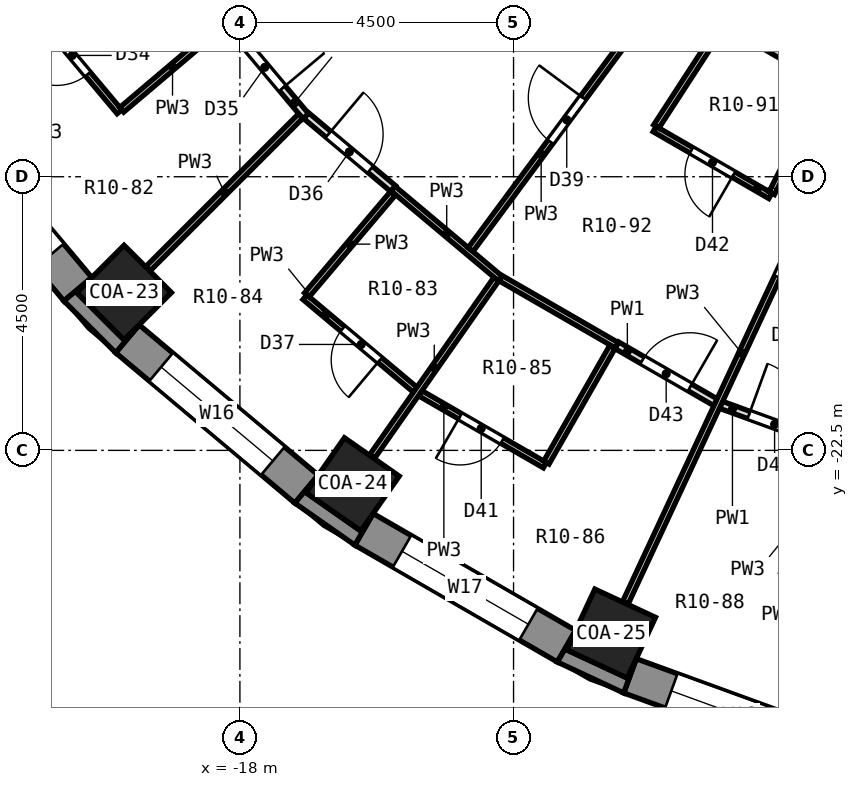
"""IFC4 building model, lengths in metres.
Left out: names, types, materials, properties, quantities, classifications, styles, units other than length and angle.
Written with IfcOpenShell. Run it as: python <this file> out.ifc"""

import sys

from ifc_helpers import new_model, si_unit, direction, frame, frame_2d, origin, origin_2d, place, context, subcontext, project, spatial, polyline, rectangle, outline, extrude, element, fill, save


model = new_model("IFC4")
c1 = context("Model", 3, precision=1e-05, world=origin(), true_north=direction((0.0, 1.0)))
c2 = subcontext(c1, "Body", "Model", "MODEL_VIEW")
j1 = project(units=[si_unit("LENGTHUNIT", "METRE"), si_unit("PLANEANGLEUNIT", "RADIAN")], contexts=[c1])
p1 = place(None, origin())
s1 = spatial("IfcSite", under=j1, at=p1, CompositionType="ELEMENT")
p2 = place(p1, origin())
s2 = spatial("IfcBuilding", under=s1, at=p2, CompositionType="ELEMENT")
p3 = place(p2, frame((0.0, 0.0, 36.2)))
s3 = spatial("IfcBuildingStorey", under=s2, at=p3, CompositionType="ELEMENT", Elevation=36.2)
for number, where, z_axis, x_axis in (
    (1, (-19.905, -19.905, 0.0), (0.0, 0.0, 1.0), (-0.707, -0.707, 0.0)),
    (2, (-16.146, -23.059, 0.0), (0.0, 0.0, 1.0), (-0.574, -0.819, 0.0)),
    (3, (-11.897, -25.512, 0.0), (0.0, 0.0, 1.0), (-0.423, -0.906, 0.0)),
):
    element("IfcColumn", number, at=place(p3, frame(where, z_axis=z_axis, x_axis=x_axis)), inside=s3, PredefinedType="COLUMN", context=c2, shape_type="SweptSolid", body=[
        extrude(rectangle(XDim=1.1, YDim=1.1, at=origin_2d()), origin(), (0.0, 0.0, 1.0), 3.3),
    ])
p4 = place(p3, frame((-23.137, -16.904, 0.0), z_axis=(0.0, 0.0, 1.0), x_axis=(0.642809392687, -0.766026164483, 0.0)))
e4 = element("IfcWall", 4, at=p4, inside=s3, PredefinedType="SOLIDWALL", context=c2, shape_type="SweptSolid", body=[
    extrude(rectangle(XDim=3.846, YDim=0.6, at=frame_2d((1.923, 0.0))), origin(), (0.0, 0.0, 1.0), 2.75),
])
p5 = place(p4, frame((0.723, 0.0, 0.9)))
e5 = element("IfcOpeningElement", 5, at=p5, cuts=e4, PredefinedType="OPENING", context=c2, shape_type="SweptSolid", body=[
    extrude(rectangle(XDim=2.4, YDim=1.8, at=frame_2d((1.2, 0.9))), frame((0.0, 0.312, 0.0), z_axis=(0.0, -1.0, 0.0), x_axis=(1.0, 0.0, 0.0)), (0.0, 0.0, 1.0), 0.624),
])
p6 = place(p3, frame((-19.85, -20.665, 0.0), z_axis=(0.0, 0.0, 1.0), x_axis=(0.766026164483, -0.642809392687, 0.0)))
e6 = element("IfcWall", 6, at=p6, inside=s3, PredefinedType="SOLIDWALL", context=c2, shape_type="SweptSolid", body=[
    extrude(rectangle(XDim=3.846, YDim=0.6, at=frame_2d((1.923, 0.0))), origin(), (0.0, 0.0, 1.0), 2.75),
])
p7 = place(p6, frame((0.723, 0.0, 0.9)))
e7 = element("IfcOpeningElement", 7, at=p7, cuts=e6, PredefinedType="OPENING", context=c2, shape_type="SweptSolid", body=[
    extrude(rectangle(XDim=2.4, YDim=1.8, at=frame_2d((1.2, 0.9))), frame((0.0, 0.312, 0.0), z_axis=(0.0, -1.0, 0.0), x_axis=(1.0, 0.0, 0.0)), (0.0, 0.0, 1.0), 0.624),
])
p8 = place(p3, frame((-15.96, -23.798, 0.0), z_axis=(0.0, 0.0, 1.0), x_axis=(0.86603124159, -0.499989888488, 0.0)))
e8 = element("IfcWall", 8, at=p8, inside=s3, PredefinedType="SOLIDWALL", context=c2, shape_type="SweptSolid", body=[
    extrude(rectangle(XDim=3.846, YDim=0.6, at=frame_2d((1.923, 0.0))), origin(), (0.0, 0.0, 1.0), 2.75),
])
p9 = place(p8, frame((0.723, 0.0, 0.9)))
e9 = element("IfcOpeningElement", 9, at=p9, cuts=e8, PredefinedType="OPENING", context=c2, shape_type="SweptSolid", body=[
    extrude(rectangle(XDim=2.4, YDim=1.8, at=frame_2d((1.2, 0.9))), frame((0.0, 0.312, 0.0), z_axis=(0.0, -1.0, 0.0), x_axis=(1.0, 0.0, 0.0)), (0.0, 0.0, 1.0), 0.624),
])
p10 = place(p3, frame((-11.585, -26.208, 0.0), z_axis=(0.0, 0.0, 1.0), x_axis=(0.939689588564, -0.342028474173, 0.0)))
e10 = element("IfcWall", 10, at=p10, inside=s3, PredefinedType="SOLIDWALL", context=c2, shape_type="SweptSolid", body=[
    extrude(rectangle(XDim=3.846, YDim=0.6, at=frame_2d((1.923, 0.0))), origin(), (0.0, 0.0, 1.0), 2.75),
])
p11 = place(p10, frame((0.723, 0.0, 0.9)))
e11 = element("IfcOpeningElement", 11, at=p11, cuts=e10, PredefinedType="OPENING", context=c2, shape_type="SweptSolid", body=[
    extrude(rectangle(XDim=2.4, YDim=1.8, at=frame_2d((1.2, 0.9))), frame((0.0, 0.312, 0.0), z_axis=(0.0, -1.0, 0.0), x_axis=(1.0, 0.0, 0.0)), (0.0, 0.0, 1.0), 0.624),
])
p12 = place(p3, origin())
e12 = element("IfcWall", 12, at=p12, inside=s3, PredefinedType="SOLIDWALL", context=c2, shape_type="SweptSolid", body=[
    extrude(outline(polyline([(-20.043, -20.895), (-19.657, -20.435), (-19.905, -20.683), (-20.683, -19.905), (-20.435, -19.657), (-20.895, -20.043), (-20.043, -20.895)])), origin(), (0.0, 0.0, 1.0), 2.75),
])
p13 = place(p3, origin())
e13 = element("IfcWall", 13, at=p13, inside=s3, PredefinedType="SOLIDWALL", context=c2, shape_type="SweptSolid", body=[
    extrude(outline(polyline([(-17.097, -23.367), (-16.11, -24.058), (-15.81, -23.538), (-16.011, -23.825), (-16.912, -23.194), (-16.711, -22.907), (-17.097, -23.367)])), origin(), (0.0, 0.0, 1.0), 2.75),
])
p14 = place(p3, origin())
e14 = element("IfcWall", 14, at=p14, inside=s3, PredefinedType="SOLIDWALL", context=c2, shape_type="SweptSolid", body=[
    extrude(outline(polyline([(-11.688, -26.49), (-11.483, -25.926), (-11.631, -26.243), (-12.628, -25.779), (-12.479, -25.461), (-12.78, -25.981), (-11.688, -26.49)])), origin(), (0.0, 0.0, 1.0), 2.75),
])
p15 = place(p3, frame((-21.503, -15.117, 0.0), z_axis=(0.0, 0.0, 1.0), x_axis=(0.642807507344, -0.766027746561, 0.0)))
e15 = element("IfcWall", 15, at=p15, inside=s3, PredefinedType="PARTITIONING", context=c2, shape_type="SweptSolid", body=[
    extrude(rectangle(XDim=2.368, YDim=0.1, at=frame_2d((1.184, 0.0))), origin(), (0.0, 0.0, 1.0), 2.75),
])
p16 = place(p15, frame((0.759, 0.0, 0.0)))
e16 = element("IfcOpeningElement", 16, at=p16, cuts=e15, PredefinedType="OPENING", context=c2, shape_type="SweptSolid", body=[
    extrude(rectangle(XDim=0.8, YDim=2.1, at=frame_2d((0.4, 1.05))), frame((0.0, 0.062, 0.0), z_axis=(0.0, -1.0, 0.0), x_axis=(1.0, 0.0, 0.0)), (0.0, 0.0, 1.0), 0.124),
])
p17 = place(p3, frame((-18.194, -15.482, 0.0), z_axis=(0.0, 0.0, 1.0), x_axis=(0.642633191675, -0.766173988698, 0.0)))
e17 = element("IfcWall", 17, at=p17, inside=s3, PredefinedType="PARTITIONING", context=c2, shape_type="SweptSolid", body=[
    extrude(rectangle(XDim=1.988, YDim=0.125, at=frame_2d((0.994, 0.0))), origin(), (0.0, 0.0, 1.0), 2.75),
])
p18 = place(p17, frame((0.487, 0.0, 0.0)))
e18 = element("IfcOpeningElement", 18, at=p18, cuts=e17, PredefinedType="OPENING", context=c2, shape_type="SweptSolid", body=[
    extrude(rectangle(XDim=0.9, YDim=2.1, at=frame_2d((0.45, 1.05))), frame((0.0, 0.074, 0.0), z_axis=(0.0, -1.0, 0.0), x_axis=(1.0, 0.0, 0.0)), (0.0, 0.0, 1.0), 0.149),
])
p19 = place(p3, frame((-16.931, -19.981, 0.0), z_axis=(0.0, 0.0, 1.0), x_axis=(0.766027746561, -0.642807507344, 0.0)))
e19 = element("IfcWall", 19, at=p19, inside=s3, PredefinedType="PARTITIONING", context=c2, shape_type="SweptSolid", body=[
    extrude(rectangle(XDim=2.368, YDim=0.1, at=frame_2d((1.184, 0.0))), origin(), (0.0, 0.0, 1.0), 2.75),
])
p20 = place(p19, frame((0.809, 0.0, 0.0)))
e20 = element("IfcOpeningElement", 20, at=p20, cuts=e19, PredefinedType="OPENING", context=c2, shape_type="SweptSolid", body=[
    extrude(rectangle(XDim=0.8, YDim=2.1, at=frame_2d((0.4, 1.05))), frame((0.0, 0.062, 0.0), z_axis=(0.0, -1.0, 0.0), x_axis=(1.0, 0.0, 0.0)), (0.0, 0.0, 1.0), 0.124),
])
p21 = place(p3, frame((-15.482, -18.194, 0.0), z_axis=(0.0, 0.0, 1.0), x_axis=(0.765838323525, -0.643033173499, 0.0)))
e21 = element("IfcWall", 21, at=p21, inside=s3, PredefinedType="PARTITIONING", context=c2, shape_type="SweptSolid", body=[
    extrude(rectangle(XDim=2.306, YDim=0.1, at=frame_2d((1.153, 0.0))), origin(), (0.0, 0.0, 1.0), 2.75),
])
p22 = place(p3, frame((-16.909, -16.997, 0.0), z_axis=(0.0, 0.0, 1.0), x_axis=(0.766154061521, -0.642656948935, 0.0)))
e22 = element("IfcWall", 22, at=p22, inside=s3, PredefinedType="PARTITIONING", context=c2, shape_type="SweptSolid", body=[
    extrude(rectangle(XDim=1.862, YDim=0.125, at=frame_2d((0.931, 0.0))), origin(), (0.0, 0.0, 1.0), 2.75),
])
p23 = place(p22, frame((0.475, 0.0, 0.0)))
e23 = element("IfcOpeningElement", 23, at=p23, cuts=e22, PredefinedType="OPENING", context=c2, shape_type="SweptSolid", body=[
    extrude(rectangle(XDim=0.9, YDim=2.1, at=frame_2d((0.45, 1.05))), frame((0.0, 0.074, 0.0), z_axis=(0.0, -1.0, 0.0), x_axis=(1.0, 0.0, 0.0)), (0.0, 0.0, 1.0), 0.149),
])
p24 = place(p3, frame((-15.036, -21.56, 0.0), z_axis=(0.0, 0.0, 1.0), x_axis=(0.866032766724, -0.499987246797, 0.0)))
e24 = element("IfcWall", 24, at=p24, inside=s3, PredefinedType="PARTITIONING", context=c2, shape_type="SweptSolid", body=[
    extrude(rectangle(XDim=2.368, YDim=0.1, at=frame_2d((1.184, 0.0))), origin(), (0.0, 0.0, 1.0), 2.75),
])
p25 = place(p24, frame((0.759, 0.0, 0.0)))
e25 = element("IfcOpeningElement", 25, at=p25, cuts=e24, PredefinedType="OPENING", context=c2, shape_type="SweptSolid", body=[
    extrude(rectangle(XDim=0.8, YDim=2.1, at=frame_2d((0.4, 1.05))), frame((0.0, 0.062, 0.0), z_axis=(0.0, -1.0, 0.0), x_axis=(1.0, 0.0, 0.0)), (0.0, 0.0, 1.0), 0.124),
])
p26 = place(p3, frame((-13.712, -19.669, 0.0), z_axis=(0.0, 0.0, 1.0), x_axis=(0.865958826185, -0.500115298058, 0.0)))
e26 = element("IfcWall", 26, at=p26, inside=s3, PredefinedType="PARTITIONING", context=c2, shape_type="SweptSolid", body=[
    extrude(rectangle(XDim=2.206, YDim=0.1, at=frame_2d((1.103, 0.0))), origin(), (0.0, 0.0, 1.0), 2.75),
])
p27 = place(p3, frame((-11.802, -20.772, 0.0), z_axis=(0.0, 0.0, 1.0), x_axis=(0.866103179807, -0.499865263774, 0.0)))
e27 = element("IfcWall", 27, at=p27, inside=s3, PredefinedType="PARTITIONING", context=c2, shape_type="SweptSolid", body=[
    extrude(rectangle(XDim=1.875, YDim=0.125, at=frame_2d((0.937, 0.0))), origin(), (0.0, 0.0, 1.0), 2.75),
])
p28 = place(p27, frame((0.487, 0.0, 0.0)))
e28 = element("IfcOpeningElement", 28, at=p28, cuts=e27, PredefinedType="OPENING", context=c2, shape_type="SweptSolid", body=[
    extrude(rectangle(XDim=0.9, YDim=2.1, at=frame_2d((0.45, 1.05))), frame((0.0, 0.074, 0.0), z_axis=(0.0, -1.0, 0.0), x_axis=(1.0, 0.0, 0.0)), (0.0, 0.0, 1.0), 0.149),
])
p29 = place(p3, frame((-11.18, -17.216, 0.0), z_axis=(0.0, 0.0, 1.0), x_axis=(0.865970937006, -0.500094327363, 0.0)))
e29 = element("IfcWall", 29, at=p29, inside=s3, PredefinedType="PARTITIONING", context=c2, shape_type="SweptSolid", body=[
    extrude(rectangle(XDim=2.197, YDim=0.1, at=frame_2d((1.099, 0.0))), origin(), (0.0, 0.0, 1.0), 2.75),
])
p30 = place(p29, frame((0.699, 0.0, 0.0)))
e30 = element("IfcOpeningElement", 30, at=p30, cuts=e29, PredefinedType="OPENING", context=c2, shape_type="SweptSolid", body=[
    extrude(rectangle(XDim=0.8, YDim=2.1, at=frame_2d((0.4, 1.05))), frame((0.0, 0.062, 0.0), z_axis=(0.0, -1.0, 0.0), x_axis=(1.0, 0.0, 0.0)), (0.0, 0.0, 1.0), 0.124),
])
p31 = place(p3, frame((-13.416, -13.501, 0.0), z_axis=(0.0, 0.0, 1.0), x_axis=(0.86605048973, -0.49995654735, 0.0)))
e31 = element("IfcWall", 31, at=p31, inside=s3, PredefinedType="PARTITIONING", context=c2, shape_type="SweptSolid", body=[
    extrude(rectangle(XDim=9.871, YDim=0.125, at=frame_2d((4.935, 0.0))), origin(), (0.0, 0.0, 1.0), 2.75),
])
p32 = place(p31, frame((2.938, 0.0, 0.0)))
e32 = element("IfcOpeningElement", 32, at=p32, cuts=e31, PredefinedType="OPENING", context=c2, shape_type="SweptSolid", body=[
    extrude(rectangle(XDim=0.8, YDim=2.1, at=frame_2d((0.4, 1.05))), frame((0.0, 0.074, 0.0), z_axis=(0.0, -1.0, 0.0), x_axis=(1.0, 0.0, 0.0)), (0.0, 0.0, 1.0), 0.149),
])
p33 = place(p3, frame((-10.088, -21.751, 0.0), z_axis=(0.0, 0.0, 1.0), x_axis=(0.939656514106, -0.342119329325, 0.0)))
e33 = element("IfcWall", 33, at=p33, inside=s3, PredefinedType="PARTITIONING", context=c2, shape_type="SweptSolid", body=[
    extrude(rectangle(XDim=1.875, YDim=0.125, at=frame_2d((0.938, 0.0))), origin(), (0.0, 0.0, 1.0), 2.75),
])
p34 = place(p33, frame((0.488, 0.0, 0.0)))
e34 = element("IfcOpeningElement", 34, at=p34, cuts=e33, PredefinedType="OPENING", context=c2, shape_type="SweptSolid", body=[
    extrude(rectangle(XDim=0.9, YDim=2.1, at=frame_2d((0.45, 1.05))), frame((0.0, 0.074, 0.0), z_axis=(0.0, -1.0, 0.0), x_axis=(1.0, 0.0, 0.0)), (0.0, 0.0, 1.0), 0.149),
])
p35 = place(p3, frame((-19.943, -16.899, 0.0), z_axis=(0.0, 0.0, 1.0), x_axis=(0.762954369322, 0.646452341887, 0.0)))
e35 = element("IfcWall", 35, at=p35, inside=s3, PredefinedType="PARTITIONING", context=c2, shape_type="SweptSolid", body=[
    extrude(rectangle(XDim=2.188, YDim=0.1, at=frame_2d((1.094, 0.0))), origin(), (0.0, 0.0, 1.0), 2.75),
])
p36 = place(p3, frame((-19.509, -19.509, 0.0), z_axis=(0.0, 0.0, 1.0), x_axis=(0.707106781187, 0.707106781187, 0.0)))
e36 = element("IfcWall", 36, at=p36, inside=s3, PredefinedType="PARTITIONING", context=c2, shape_type="SweptSolid", body=[
    extrude(rectangle(XDim=3.547, YDim=0.1, at=frame_2d((1.773, 0.0))), origin(), (0.0, 0.0, 1.0), 2.75),
])
p37 = place(p3, frame((-16.899, -19.943, 0.0), z_axis=(0.0, 0.0, 1.0), x_axis=(0.646452341887, 0.762954369322, 0.0)))
e37 = element("IfcWall", 37, at=p37, inside=s3, PredefinedType="PARTITIONING", context=c2, shape_type="SweptSolid", body=[
    extrude(rectangle(XDim=2.188, YDim=0.1, at=frame_2d((1.094, 0.0))), origin(), (0.0, 0.0, 1.0), 2.75),
])
p38 = place(p3, frame((-14.207, -19.199, 0.0), z_axis=(0.0, 0.0, 1.0), x_axis=(0.595318943931, 0.80348948655, 0.0)))
e38 = element("IfcWall", 38, at=p38, inside=s3, PredefinedType="PARTITIONING", context=c2, shape_type="SweptSolid", body=[
    extrude(rectangle(XDim=5.302, YDim=0.1, at=frame_2d((2.651, 0.0))), origin(), (0.0, 0.0, 1.0), 2.75),
])
p39 = place(p38, frame((2.207, 0.0, 0.0)))
e39 = element("IfcOpeningElement", 39, at=p39, cuts=e38, PredefinedType="OPENING", context=c2, shape_type="SweptSolid", body=[
    extrude(rectangle(XDim=0.9, YDim=2.1, at=frame_2d((0.45, 1.05))), frame((0.0, 0.062, 0.0), z_axis=(0.0, -1.0, 0.0), x_axis=(1.0, 0.0, 0.0)), (0.0, 0.0, 1.0), 0.124),
])
p40 = place(p3, frame((-15.825, -22.6, 0.0), z_axis=(0.0, 0.0, 1.0), x_axis=(0.573536002802, 0.819180354678, 0.0)))
e40 = element("IfcWall", 40, at=p40, inside=s3, PredefinedType="PARTITIONING", context=c2, shape_type="SweptSolid", body=[
    extrude(rectangle(XDim=3.559, YDim=0.1, at=frame_2d((1.78, 0.0))), origin(), (0.0, 0.0, 1.0), 2.75),
])
p41 = place(p3, frame((-11.153, -17.174, 0.0), z_axis=(0.0, 0.0, 1.0), x_axis=(0.544664848093, 0.838653804172, 0.0)))
e41 = element("IfcWall", 41, at=p41, inside=s3, PredefinedType="PARTITIONING", context=c2, shape_type="SweptSolid", body=[
    extrude(rectangle(XDim=1.99, YDim=0.1, at=frame_2d((0.995, 0.0))), origin(), (0.0, 0.0, 1.0), 2.75),
])
p42 = place(p3, frame((-12.96, -22.701, 0.0), z_axis=(0.0, 0.0, 1.0), x_axis=(0.495742176046, 0.86846974322, 0.0)))
e42 = element("IfcWall", 42, at=p42, inside=s3, PredefinedType="PARTITIONING", context=c2, shape_type="SweptSolid", body=[
    extrude(rectangle(XDim=2.187, YDim=0.1, at=frame_2d((1.094, 0.0))), origin(), (0.0, 0.0, 1.0), 2.75),
])
p43 = place(p3, frame((-9.254, -18.271, 0.0), z_axis=(0.0, 0.0, 1.0), x_axis=(0.451770869898, 0.89213400401, 0.0)))
e43 = element("IfcWall", 43, at=p43, inside=s3, PredefinedType="PARTITIONING", context=c2, shape_type="SweptSolid", body=[
    extrude(rectangle(XDim=1.99, YDim=0.1, at=frame_2d((0.995, 0.0))), origin(), (0.0, 0.0, 1.0), 2.75),
])
p44 = place(p3, frame((-11.66, -25.005, 0.0), z_axis=(0.0, 0.0, 1.0), x_axis=(0.422646386434, 0.906294671745, 0.0)))
e44 = element("IfcWall", 44, at=p44, inside=s3, PredefinedType="PARTITIONING", context=c2, shape_type="SweptSolid", body=[
    extrude(rectangle(XDim=9.057, YDim=0.1, at=frame_2d((4.528, 0.0))), origin(), (0.0, 0.0, 1.0), 2.75),
])
p45 = place(p44, frame((5.914, 0.0, 0.0)))
e45 = element("IfcOpeningElement", 45, at=p45, cuts=e44, PredefinedType="OPENING", context=c2, shape_type="SweptSolid", body=[
    extrude(rectangle(XDim=0.9, YDim=2.1, at=frame_2d((0.45, 1.05))), frame((0.0, 0.062, 0.0), z_axis=(0.0, -1.0, 0.0), x_axis=(1.0, 0.0, 0.0)), (0.0, 0.0, 1.0), 0.124),
])
p46 = place(p5, origin())
e46 = element("IfcWindow", 46, at=p46, inside=s3, PartitioningType="SINGLE_PANEL", PredefinedType="WINDOW", context=c2, shape_type="SweptSolid", body=[
    extrude(rectangle(XDim=2.4, YDim=1.8, at=frame_2d((1.2, 0.9))), frame((0.0, 0.18, 0.0), z_axis=(0.0, -1.0, 0.0), x_axis=(1.0, 0.0, 0.0)), (0.0, 0.0, 1.0), 0.06),
])
fill(e5, e46)
p47 = place(p7, origin())
e47 = element("IfcWindow", 47, at=p47, inside=s3, PartitioningType="SINGLE_PANEL", PredefinedType="WINDOW", context=c2, shape_type="SweptSolid", body=[
    extrude(rectangle(XDim=2.4, YDim=1.8, at=frame_2d((1.2, 0.9))), frame((0.0, 0.18, 0.0), z_axis=(0.0, -1.0, 0.0), x_axis=(1.0, 0.0, 0.0)), (0.0, 0.0, 1.0), 0.06),
])
fill(e7, e47)
p48 = place(p9, origin())
e48 = element("IfcWindow", 48, at=p48, inside=s3, PartitioningType="SINGLE_PANEL", PredefinedType="WINDOW", context=c2, shape_type="SweptSolid", body=[
    extrude(rectangle(XDim=2.4, YDim=1.8, at=frame_2d((1.2, 0.9))), frame((0.0, 0.18, 0.0), z_axis=(0.0, -1.0, 0.0), x_axis=(1.0, 0.0, 0.0)), (0.0, 0.0, 1.0), 0.06),
])
fill(e9, e48)
p49 = place(p11, origin())
e49 = element("IfcWindow", 49, at=p49, inside=s3, PartitioningType="SINGLE_PANEL", PredefinedType="WINDOW", context=c2, shape_type="SweptSolid", body=[
    extrude(rectangle(XDim=2.4, YDim=1.8, at=frame_2d((1.2, 0.9))), frame((0.0, 0.18, 0.0), z_axis=(0.0, -1.0, 0.0), x_axis=(1.0, 0.0, 0.0)), (0.0, 0.0, 1.0), 0.06),
])
fill(e11, e49)
p50 = place(p16, frame((0.8, 0.0, 0.0), z_axis=(0.0, 0.0, 1.0), x_axis=(-1.0, 0.0, 0.0)))
e50 = element("IfcDoor", 50, at=p50, inside=s3, OperationType="SINGLE_SWING_RIGHT", PredefinedType="DOOR", context=c2, shape_type="SweptSolid", body=[
    extrude(rectangle(XDim=0.8, YDim=2.1, at=frame_2d((0.4, 1.05))), frame((0.0, 0.025, 0.0), z_axis=(0.0, -1.0, 0.0), x_axis=(1.0, 0.0, 0.0)), (0.0, 0.0, 1.0), 0.05),
])
fill(e16, e50)
p51 = place(p18, origin())
e51 = element("IfcDoor", 51, at=p51, inside=s3, OperationType="SINGLE_SWING_RIGHT", PredefinedType="DOOR", context=c2, shape_type="SweptSolid", body=[
    extrude(rectangle(XDim=0.9, YDim=2.1, at=frame_2d((0.45, 1.05))), frame((0.0, 0.025, 0.0), z_axis=(0.0, -1.0, 0.0), x_axis=(1.0, 0.0, 0.0)), (0.0, 0.0, 1.0), 0.05),
])
fill(e18, e51)
p52 = place(p23, origin())
e52 = element("IfcDoor", 52, at=p52, inside=s3, OperationType="SINGLE_SWING_LEFT", PredefinedType="DOOR", context=c2, shape_type="SweptSolid", body=[
    extrude(rectangle(XDim=0.9, YDim=2.1, at=frame_2d((0.45, 1.05))), frame((0.0, 0.025, 0.0), z_axis=(0.0, -1.0, 0.0), x_axis=(1.0, 0.0, 0.0)), (0.0, 0.0, 1.0), 0.05),
])
fill(e23, e52)
p53 = place(p20, frame((0.8, 0.0, 0.0), z_axis=(0.0, 0.0, 1.0), x_axis=(-1.0, 0.0, 0.0)))
e53 = element("IfcDoor", 53, at=p53, inside=s3, OperationType="SINGLE_SWING_LEFT", PredefinedType="DOOR", context=c2, shape_type="SweptSolid", body=[
    extrude(rectangle(XDim=0.8, YDim=2.1, at=frame_2d((0.4, 1.05))), frame((0.0, 0.025, 0.0), z_axis=(0.0, -1.0, 0.0), x_axis=(1.0, 0.0, 0.0)), (0.0, 0.0, 1.0), 0.05),
])
fill(e20, e53)
p54 = place(p39, origin())
e54 = element("IfcDoor", 54, at=p54, inside=s3, OperationType="SINGLE_SWING_RIGHT", PredefinedType="DOOR", context=c2, shape_type="SweptSolid", body=[
    extrude(rectangle(XDim=0.9, YDim=2.1, at=frame_2d((0.45, 1.05))), frame((0.0, 0.025, 0.0), z_axis=(0.0, -1.0, 0.0), x_axis=(1.0, 0.0, 0.0)), (0.0, 0.0, 1.0), 0.05),
])
fill(e39, e54)
p55 = place(p25, frame((0.8, 0.0, 0.0), z_axis=(0.0, 0.0, 1.0), x_axis=(-1.0, 0.0, 0.0)))
e55 = element("IfcDoor", 55, at=p55, inside=s3, OperationType="SINGLE_SWING_RIGHT", PredefinedType="DOOR", context=c2, shape_type="SweptSolid", body=[
    extrude(rectangle(XDim=0.8, YDim=2.1, at=frame_2d((0.4, 1.05))), frame((0.0, 0.025, 0.0), z_axis=(0.0, -1.0, 0.0), x_axis=(1.0, 0.0, 0.0)), (0.0, 0.0, 1.0), 0.05),
])
fill(e25, e55)
p56 = place(p30, frame((0.8, 0.0, 0.0), z_axis=(0.0, 0.0, 1.0), x_axis=(-1.0, 0.0, 0.0)))
e56 = element("IfcDoor", 56, at=p56, inside=s3, OperationType="SINGLE_SWING_LEFT", PredefinedType="DOOR", context=c2, shape_type="SweptSolid", body=[
    extrude(rectangle(XDim=0.8, YDim=2.1, at=frame_2d((0.4, 1.05))), frame((0.0, 0.025, 0.0), z_axis=(0.0, -1.0, 0.0), x_axis=(1.0, 0.0, 0.0)), (0.0, 0.0, 1.0), 0.05),
])
fill(e30, e56)
p57 = place(p28, origin())
e57 = element("IfcDoor", 57, at=p57, inside=s3, OperationType="SINGLE_SWING_RIGHT", PredefinedType="DOOR", context=c2, shape_type="SweptSolid", body=[
    extrude(rectangle(XDim=0.9, YDim=2.1, at=frame_2d((0.45, 1.05))), frame((0.0, 0.025, 0.0), z_axis=(0.0, -1.0, 0.0), x_axis=(1.0, 0.0, 0.0)), (0.0, 0.0, 1.0), 0.05),
])
fill(e28, e57)
p58 = place(p45, frame((0.9, 0.0, 0.0), z_axis=(0.0, 0.0, 1.0), x_axis=(-1.0, 0.0, 0.0)))
e58 = element("IfcDoor", 58, at=p58, inside=s3, OperationType="SINGLE_SWING_LEFT", PredefinedType="DOOR", context=c2, shape_type="SweptSolid", body=[
    extrude(rectangle(XDim=0.9, YDim=2.1, at=frame_2d((0.45, 1.05))), frame((0.0, 0.025, 0.0), z_axis=(0.0, -1.0, 0.0), x_axis=(1.0, 0.0, 0.0)), (0.0, 0.0, 1.0), 0.05),
])
fill(e45, e58)
p59 = place(p34, origin())
e59 = element("IfcDoor", 59, at=p59, inside=s3, OperationType="SINGLE_SWING_LEFT", PredefinedType="DOOR", context=c2, shape_type="SweptSolid", body=[
    extrude(rectangle(XDim=0.9, YDim=2.1, at=frame_2d((0.45, 1.05))), frame((0.0, 0.025, 0.0), z_axis=(0.0, -1.0, 0.0), x_axis=(1.0, 0.0, 0.0)), (0.0, 0.0, 1.0), 0.05),
])
fill(e34, e59)
save(model, sys.argv[1])
